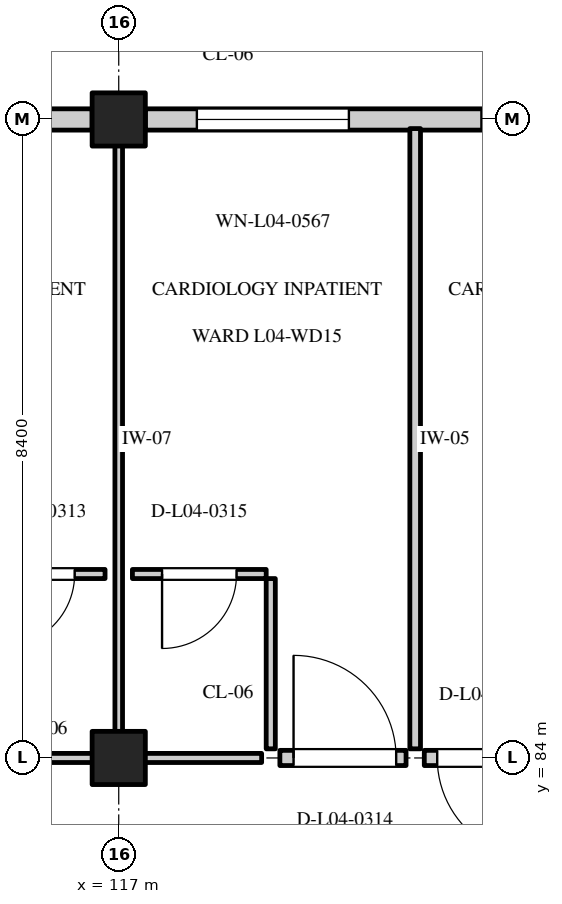
"""IFC4 building model, lengths in metres.
Left out: names, types, materials, properties, quantities, classifications, styles, units other than length and angle.
Written with IfcOpenShell. Run it as: python <this file> out.ifc"""

import sys

from ifc_helpers import new_model, si_unit, direction, frame, frame_2d, origin, origin_2d, place, context, subcontext, project, spatial, rectangle, extrude, element, fill, save


model = new_model("IFC4")
c1 = context("Model", 3, precision=1e-05, world=origin(), true_north=direction((0.0, 1.0)))
c2 = subcontext(c1, "Body", "Model", "MODEL_VIEW")
j1 = project(units=[si_unit("LENGTHUNIT", "METRE"), si_unit("PLANEANGLEUNIT", "RADIAN")], contexts=[c1])
p1 = place(None, origin())
s1 = spatial("IfcSite", under=j1, at=p1, CompositionType="ELEMENT")
p2 = place(p1, origin())
s2 = spatial("IfcBuilding", under=s1, at=p2, CompositionType="ELEMENT")
p3 = place(p2, frame((0.0, 0.0, 18.0)))
s3 = spatial("IfcBuildingStorey", under=s2, at=p3, CompositionType="ELEMENT", Elevation=18.0)
for number, where, z_axis, x_axis in (
    (1, (117.0, 84.0, 0.0), (0.0, 0.0, 1.0), (1.0, 0.0, 0.0)),
    (2, (117.0, 92.4, 0.0), (0.0, 0.0, 1.0), (1.0, 0.0, 0.0)),
):
    element("IfcColumn", number, at=place(p3, frame(where, z_axis=z_axis, x_axis=x_axis)), inside=s3, PredefinedType="COLUMN", context=c2, shape_type="SweptSolid", body=[
        extrude(rectangle(XDim=0.7, YDim=0.7, at=origin_2d()), origin(), (0.0, 0.0, 1.0), 4.2),
    ])
p4 = place(p3, frame((109.55, 92.4, 0.0), z_axis=(0.0, 0.0, 1.0), x_axis=(1.0, 0.0, 0.0)))
e3 = element("IfcWall", 3, at=p4, inside=s3, PredefinedType="STANDARD", context=c2, shape_type="SweptSolid", body=[
    extrude(rectangle(XDim=7.1, YDim=0.28, at=frame_2d((3.55, 0.0))), origin(), (0.0, 0.0, 1.0), 3.335),
])
p5 = place(p4, frame((0.678, 0.0, 0.8)))
e4 = element("IfcOpeningElement", 4, at=p5, cuts=e3, PredefinedType="OPENING", context=c2, shape_type="SweptSolid", body=[
    extrude(rectangle(XDim=2.0, YDim=1.55, at=frame_2d((1.0, 0.775))), frame((0.0, 0.152, 0.0), z_axis=(0.0, -1.0, 0.0), x_axis=(1.0, 0.0, 0.0)), (0.0, 0.0, 1.0), 0.304),
])
p6 = place(p4, frame((4.422, 0.0, 0.8)))
e5 = element("IfcOpeningElement", 5, at=p6, cuts=e3, PredefinedType="OPENING", context=c2, shape_type="SweptSolid", body=[
    extrude(rectangle(XDim=2.0, YDim=1.55, at=frame_2d((1.0, 0.775))), frame((0.0, 0.152, 0.0), z_axis=(0.0, -1.0, 0.0), x_axis=(1.0, 0.0, 0.0)), (0.0, 0.0, 1.0), 0.304),
])
p7 = place(p3, frame((117.35, 92.4, 0.0), z_axis=(0.0, 0.0, 1.0), x_axis=(1.0, 0.0, 0.0)))
e6 = element("IfcWall", 6, at=p7, inside=s3, PredefinedType="STANDARD", context=c2, shape_type="SweptSolid", body=[
    extrude(rectangle(XDim=7.1, YDim=0.28, at=frame_2d((3.55, 0.0))), origin(), (0.0, 0.0, 1.0), 3.335),
])
p8 = place(p7, frame((0.678, 0.0, 0.8)))
e7 = element("IfcOpeningElement", 7, at=p8, cuts=e6, PredefinedType="OPENING", context=c2, shape_type="SweptSolid", body=[
    extrude(rectangle(XDim=2.0, YDim=1.45, at=frame_2d((1.0, 0.725))), frame((0.0, 0.152, 0.0), z_axis=(0.0, -1.0, 0.0), x_axis=(1.0, 0.0, 0.0)), (0.0, 0.0, 1.0), 0.304),
])
p9 = place(p7, frame((4.422, 0.0, 0.8)))
e8 = element("IfcOpeningElement", 8, at=p9, cuts=e6, PredefinedType="OPENING", context=c2, shape_type="SweptSolid", body=[
    extrude(rectangle(XDim=2.0, YDim=1.45, at=frame_2d((1.0, 0.725))), frame((0.0, 0.152, 0.0), z_axis=(0.0, -1.0, 0.0), x_axis=(1.0, 0.0, 0.0)), (0.0, 0.0, 1.0), 0.304),
])
p10 = place(p3, frame((117.0, 84.12, 0.0), z_axis=(0.0, 0.0, 1.0), x_axis=(0.0, 1.0, 0.0)))
e9 = element("IfcWall", 9, at=p10, inside=s3, PredefinedType="PARTITIONING", context=c2, shape_type="SweptSolid", body=[
    extrude(rectangle(XDim=8.16, YDim=0.1, at=frame_2d((4.08, 0.0))), origin(), (0.0, 0.0, 1.0), 3.235),
])
p11 = place(p3, frame((115.12, 84.0, 0.0), z_axis=(0.0, 0.0, 1.0), x_axis=(1.0, 0.0, 0.0)))
e10 = element("IfcWall", 10, at=p11, inside=s3, PredefinedType="PARTITIONING", context=c2, shape_type="SweptSolid", body=[
    extrude(rectangle(XDim=1.76, YDim=0.12, at=frame_2d((0.88, 0.0))), origin(), (0.0, 0.0, 1.0), 3.235),
])
p12 = place(p3, frame((115.06, 86.42, 0.0), z_axis=(0.0, 0.0, 1.0), x_axis=(1.0, 0.0, 0.0)))
e11 = element("IfcWall", 11, at=p12, inside=s3, PredefinedType="PARTITIONING", context=c2, shape_type="SweptSolid", body=[
    extrude(rectangle(XDim=1.76, YDim=0.12, at=frame_2d((0.88, 0.0))), origin(), (0.0, 0.0, 1.0), 3.865),
])
p13 = place(p12, frame((0.4, 0.0, 0.0)))
e12 = element("IfcOpeningElement", 12, at=p13, cuts=e11, PredefinedType="OPENING", context=c2, shape_type="SweptSolid", body=[
    extrude(rectangle(XDim=0.96, YDim=2.12, at=frame_2d((0.48, 1.06))), frame((0.0, 0.072, 0.0), z_axis=(0.0, -1.0, 0.0), x_axis=(1.0, 0.0, 0.0)), (0.0, 0.0, 1.0), 0.144),
])
p14 = place(p3, frame((120.9, 84.12, 0.0), z_axis=(0.0, 0.0, 1.0), x_axis=(0.0, 1.0, 0.0)))
e13 = element("IfcWall", 13, at=p14, inside=s3, PredefinedType="PARTITIONING", context=c2, shape_type="SweptSolid", body=[
    extrude(rectangle(XDim=8.16, YDim=0.14, at=frame_2d((4.08, 0.0))), origin(), (0.0, 0.0, 1.0), 3.865),
])
p15 = place(p3, frame((119.12, 84.0, 0.0), z_axis=(0.0, 0.0, 1.0), x_axis=(1.0, 0.0, 0.0)))
e14 = element("IfcWall", 14, at=p15, inside=s3, PredefinedType="STANDARD", context=c2, shape_type="SweptSolid", body=[
    extrude(rectangle(XDim=1.66, YDim=0.2, at=frame_2d((0.83, 0.0))), origin(), (0.0, 0.0, 1.0), 3.235),
])
p16 = place(p15, frame((0.18, 0.0, 0.0)))
e15 = element("IfcOpeningElement", 15, at=p16, cuts=e14, PredefinedType="OPENING", context=c2, shape_type="SweptSolid", body=[
    extrude(rectangle(XDim=1.35, YDim=2.15, at=frame_2d((0.675, 1.075))), frame((0.0, 0.112, 0.0), z_axis=(0.0, -1.0, 0.0), x_axis=(1.0, 0.0, 0.0)), (0.0, 0.0, 1.0), 0.224),
])
p17 = place(p3, frame((117.12, 84.0, 0.0), z_axis=(0.0, 0.0, 1.0), x_axis=(1.0, 0.0, 0.0)))
e16 = element("IfcWall", 16, at=p17, inside=s3, PredefinedType="PARTITIONING", context=c2, shape_type="SweptSolid", body=[
    extrude(rectangle(XDim=1.76, YDim=0.12, at=frame_2d((0.88, 0.0))), origin(), (0.0, 0.0, 1.0), 3.235),
])
p18 = place(p3, frame((119.0, 84.12, 0.0), z_axis=(0.0, 0.0, 1.0), x_axis=(0.0, 1.0, 0.0)))
e17 = element("IfcWall", 17, at=p18, inside=s3, PredefinedType="PARTITIONING", context=c2, shape_type="SweptSolid", body=[
    extrude(rectangle(XDim=2.24, YDim=0.12, at=frame_2d((1.12, 0.0))), origin(), (0.0, 0.0, 1.0), 3.865),
])
p19 = place(p3, frame((117.18, 86.42, 0.0), z_axis=(0.0, 0.0, 1.0), x_axis=(1.0, 0.0, 0.0)))
e18 = element("IfcWall", 18, at=p19, inside=s3, PredefinedType="PARTITIONING", context=c2, shape_type="SweptSolid", body=[
    extrude(rectangle(XDim=1.76, YDim=0.12, at=frame_2d((0.88, 0.0))), origin(), (0.0, 0.0, 1.0), 3.865),
])
p20 = place(p19, frame((0.39, 0.0, 0.0)))
e19 = element("IfcOpeningElement", 19, at=p20, cuts=e18, PredefinedType="OPENING", context=c2, shape_type="SweptSolid", body=[
    extrude(rectangle(XDim=0.98, YDim=2.1, at=frame_2d((0.49, 1.05))), frame((0.0, 0.072, 0.0), z_axis=(0.0, -1.0, 0.0), x_axis=(1.0, 0.0, 0.0)), (0.0, 0.0, 1.0), 0.144),
])
p21 = place(p3, frame((121.02, 84.0, 0.0), z_axis=(0.0, 0.0, 1.0), x_axis=(1.0, 0.0, 0.0)))
e20 = element("IfcWall", 20, at=p21, inside=s3, PredefinedType="STANDARD", context=c2, shape_type="SweptSolid", body=[
    extrude(rectangle(XDim=1.66, YDim=0.2, at=frame_2d((0.83, 0.0))), origin(), (0.0, 0.0, 1.0), 3.235),
])
p22 = place(p21, frame((0.17, 0.0, 0.0)))
e21 = element("IfcOpeningElement", 21, at=p22, cuts=e20, PredefinedType="OPENING", context=c2, shape_type="SweptSolid", body=[
    extrude(rectangle(XDim=1.32, YDim=2.2, at=frame_2d((0.66, 1.1))), frame((0.0, 0.112, 0.0), z_axis=(0.0, -1.0, 0.0), x_axis=(1.0, 0.0, 0.0)), (0.0, 0.0, 1.0), 0.224),
])
p23 = place(p8, origin())
e22 = element("IfcWindow", 22, at=p23, inside=s3, PartitioningType="DOUBLE_PANEL_VERTICAL", PredefinedType="WINDOW", context=c2, shape_type="SweptSolid", body=[
    extrude(rectangle(XDim=2.0, YDim=1.45, at=frame_2d((1.0, 0.725))), frame((0.0, 0.03, 0.0), z_axis=(0.0, -1.0, 0.0), x_axis=(1.0, 0.0, 0.0)), (0.0, 0.0, 1.0), 0.06),
])
fill(e7, e22)
p24 = place(p9, origin())
e23 = element("IfcWindow", 23, at=p24, inside=s3, PartitioningType="DOUBLE_PANEL_VERTICAL", PredefinedType="WINDOW", context=c2, shape_type="SweptSolid", body=[
    extrude(rectangle(XDim=2.0, YDim=1.45, at=frame_2d((1.0, 0.725))), frame((0.0, 0.03, 0.0), z_axis=(0.0, -1.0, 0.0), x_axis=(1.0, 0.0, 0.0)), (0.0, 0.0, 1.0), 0.06),
])
fill(e8, e23)
p25 = place(p13, frame((0.96, 0.0, 0.0), z_axis=(0.0, 0.0, 1.0), x_axis=(-1.0, 0.0, 0.0)))
e24 = element("IfcDoor", 24, at=p25, inside=s3, OperationType="SINGLE_SWING_RIGHT", PredefinedType="DOOR", context=c2, shape_type="SweptSolid", body=[
    extrude(rectangle(XDim=0.96, YDim=2.12, at=frame_2d((0.48, 1.06))), frame((0.0, 0.025, 0.0), z_axis=(0.0, -1.0, 0.0), x_axis=(1.0, 0.0, 0.0)), (0.0, 0.0, 1.0), 0.05),
])
fill(e12, e24)
p26 = place(p16, origin())
e25 = element("IfcDoor", 25, at=p26, inside=s3, OperationType="SINGLE_SWING_LEFT", PredefinedType="DOOR", context=c2, shape_type="SweptSolid", body=[
    extrude(rectangle(XDim=1.35, YDim=2.15, at=frame_2d((0.675, 1.075))), frame((0.0, 0.025, 0.0), z_axis=(0.0, -1.0, 0.0), x_axis=(1.0, 0.0, 0.0)), (0.0, 0.0, 1.0), 0.05),
])
fill(e15, e25)
p27 = place(p20, frame((0.98, 0.0, 0.0), z_axis=(0.0, 0.0, 1.0), x_axis=(-1.0, 0.0, 0.0)))
e26 = element("IfcDoor", 26, at=p27, inside=s3, OperationType="SINGLE_SWING_RIGHT", PredefinedType="DOOR", context=c2, shape_type="SweptSolid", body=[
    extrude(rectangle(XDim=0.98, YDim=2.1, at=frame_2d((0.49, 1.05))), frame((0.0, 0.025, 0.0), z_axis=(0.0, -1.0, 0.0), x_axis=(1.0, 0.0, 0.0)), (0.0, 0.0, 1.0), 0.05),
])
fill(e19, e26)
p28 = place(p22, origin())
e27 = element("IfcDoor", 27, at=p28, inside=s3, OperationType="SINGLE_SWING_RIGHT", PredefinedType="DOOR", context=c2, shape_type="SweptSolid", body=[
    extrude(rectangle(XDim=1.32, YDim=2.2, at=frame_2d((0.66, 1.1))), frame((0.0, 0.025, 0.0), z_axis=(0.0, -1.0, 0.0), x_axis=(1.0, 0.0, 0.0)), (0.0, 0.0, 1.0), 0.05),
])
fill(e21, e27)
save(model, sys.argv[1])
